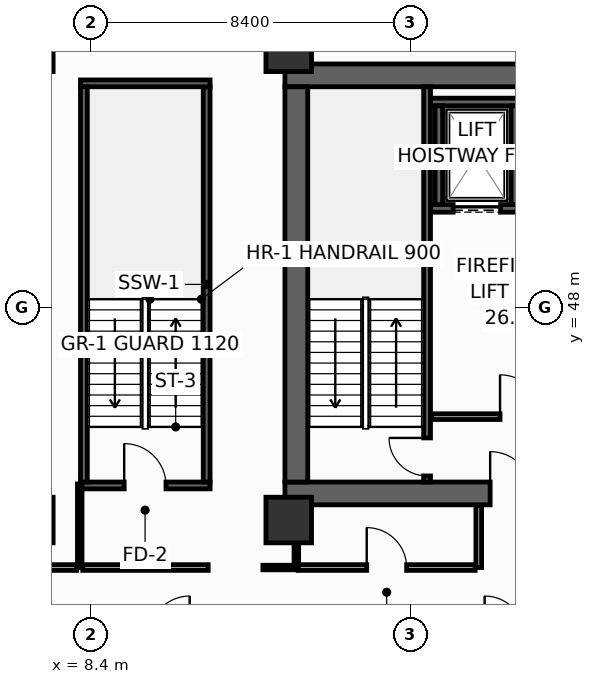
"""IFC4 building model, lengths in metres.
Left out: names, types, materials, properties, quantities, classifications, styles, units other than length and angle.
Written with IfcOpenShell. Run it as: python <this file> out.ifc"""

import sys

from ifc_helpers import new_model, si_unit, direction, frame, frame_2d, origin, origin_2d, place, context, subcontext, project, spatial, rectangle, hollow_rectangle, extrude, element, fill, save


model = new_model("IFC4")
c1 = context("Model", 3, precision=1e-05, world=origin(), true_north=direction((0.0, 1.0)))
c2 = subcontext(c1, "Body", "Model", "MODEL_VIEW")
j1 = project(units=[si_unit("LENGTHUNIT", "METRE"), si_unit("PLANEANGLEUNIT", "RADIAN")], contexts=[c1])
p1 = place(None, origin())
s1 = spatial("IfcSite", under=j1, at=p1, CompositionType="ELEMENT")
p2 = place(p1, origin())
s2 = spatial("IfcBuilding", under=s1, at=p2, CompositionType="ELEMENT")
p3 = place(p2, frame((0.0, 0.0, 60.4)))
s3 = spatial("IfcBuildingStorey", under=s2, at=p3, CompositionType="ELEMENT", Elevation=60.4)
p4 = place(p3, frame((13.5, 43.1, 0.0), z_axis=(0.0, 0.0, 1.0), x_axis=(1.0, 0.0, 0.0)))
e1 = element("IfcWall", 1, at=p4, inside=s3, PredefinedType="SHEAR", context=c2, shape_type="SweptSolid", body=[
    extrude(rectangle(XDim=32.9, YDim=0.6, at=frame_2d((16.45, 0.0))), origin(), (0.0, 0.0, 1.0), 4.15),
])
p5 = place(p4, frame((5.4, 0.0, 0.0)))
e2 = element("IfcOpeningElement", 2, at=p5, cuts=e1, PredefinedType="OPENING", context=c2, shape_type="SweptSolid", body=[
    extrude(rectangle(XDim=1.1, YDim=2.15, at=frame_2d((0.55, 1.075))), frame((0.0, 0.31, 0.0), z_axis=(0.0, -1.0, 0.0), x_axis=(1.0, 0.0, 0.0)), (0.0, 0.0, 1.0), 0.62),
])
p6 = place(p4, frame((25.6, 0.0, 0.0)))
e3 = element("IfcOpeningElement", 3, at=p6, cuts=e1, PredefinedType="OPENING", context=c2, shape_type="SweptSolid", body=[
    extrude(rectangle(XDim=1.1, YDim=2.15, at=frame_2d((0.55, 1.075))), frame((0.0, 0.31, 0.0), z_axis=(0.0, -1.0, 0.0), x_axis=(1.0, 0.0, 0.0)), (0.0, 0.0, 1.0), 0.62),
])
p7 = place(p3, frame((13.5, 54.1, 0.0), z_axis=(0.0, 0.0, 1.0), x_axis=(1.0, 0.0, 0.0)))
e4 = element("IfcWall", 4, at=p7, inside=s3, PredefinedType="SHEAR", context=c2, shape_type="SweptSolid", body=[
    extrude(rectangle(XDim=32.9, YDim=0.6, at=frame_2d((16.45, 0.0))), origin(), (0.0, 0.0, 1.0), 4.15),
])
p8 = place(p3, frame((13.8, 43.4, 0.0), z_axis=(0.0, 0.0, 1.0), x_axis=(0.0, 1.0, 0.0)))
e5 = element("IfcWall", 5, at=p8, inside=s3, PredefinedType="SHEAR", context=c2, shape_type="SweptSolid", body=[
    extrude(rectangle(XDim=10.4, YDim=0.6, at=frame_2d((5.2, 0.0))), origin(), (0.0, 0.0, 1.0), 4.15),
])
for number, where, z_axis, x_axis in (
    (6, (6.8, 54.8, 0.0), (0.0, 0.0, 1.0), (1.0, 0.0, 0.0)),
    (7, (13.6, 54.8, 0.0), (0.0, 0.0, 1.0), (1.0, 0.0, 0.0)),
    (8, (6.8, 42.4, 0.0), (0.0, 0.0, 1.0), (1.0, 0.0, 0.0)),
    (9, (13.6, 42.4, 0.0), (0.0, 0.0, 1.0), (1.0, 0.0, 0.0)),
):
    element("IfcColumn", number, at=place(p3, frame(where, z_axis=z_axis, x_axis=x_axis)), inside=s3, PredefinedType="COLUMN", context=c2, shape_type="SweptSolid", body=[
        extrude(hollow_rectangle(XDim=1.2, YDim=1.2, WallThickness=0.055, at=origin_2d()), origin(), (0.0, 0.0, 1.0), 4.4),
    ])
p9 = place(p3, frame((17.33, 50.6, 0.0), z_axis=(0.0, 0.0, 1.0), x_axis=(1.0, 0.0, 0.0)))
e10 = element("IfcWall", 10, at=p9, inside=s3, PredefinedType="SHEAR", context=c2, shape_type="SweptSolid", body=[
    extrude(rectangle(XDim=2.52, YDim=0.2, at=frame_2d((1.26, 0.0))), origin(), (0.0, 0.0, 1.0), 4.15),
])
p10 = place(p9, frame((0.595, 0.0, 0.0)))
e11 = element("IfcOpeningElement", 11, at=p10, cuts=e10, PredefinedType="OPENING", context=c2, shape_type="SweptSolid", body=[
    extrude(rectangle(XDim=1.25, YDim=2.3, at=frame_2d((0.625, 1.15))), frame((0.0, 0.11, 0.0), z_axis=(0.0, -1.0, 0.0), x_axis=(1.0, 0.0, 0.0)), (0.0, 0.0, 1.0), 0.22),
])
p11 = place(p3, frame((17.33, 53.4, 0.0), z_axis=(0.0, 0.0, 1.0), x_axis=(1.0, 0.0, 0.0)))
e12 = element("IfcWall", 12, at=p11, inside=s3, PredefinedType="SHEAR", context=c2, shape_type="SweptSolid", body=[
    extrude(rectangle(XDim=2.52, YDim=0.2, at=frame_2d((1.26, 0.0))), origin(), (0.0, 0.0, 1.0), 4.15),
])
for number, where, z_axis, x_axis in (
    (13, (17.55, 50.7, 0.0), (0.0, 0.0, 1.0), (0.0, 1.0, 0.0)),
    (14, (19.55, 50.7, 0.0), (0.0, 0.0, 1.0), (0.0, 1.0, 0.0)),
):
    element("IfcWall", number, at=place(p3, frame(where, z_axis=z_axis, x_axis=x_axis)), inside=s3, PredefinedType="SHEAR", context=c2, shape_type="SweptSolid", body=[
        extrude(rectangle(XDim=2.6, YDim=0.2, at=frame_2d((1.3, 0.0))), origin(), (0.0, 0.0, 1.0), 4.15),
    ])
p12 = place(p3, frame((17.24, 43.4, 0.0), z_axis=(0.0, 0.0, 1.0), x_axis=(0.0, 1.0, 0.0)))
e15 = element("IfcWall", 15, at=p12, inside=s3, PredefinedType="SHEAR", context=c2, shape_type="SweptSolid", body=[
    extrude(rectangle(XDim=10.4, YDim=0.18, at=frame_2d((5.2, 0.0))), origin(), (0.0, 0.0, 1.0), 4.15),
])
p13 = place(p12, frame((0.16, 0.0, 0.0)))
e16 = element("IfcOpeningElement", 16, at=p13, cuts=e15, PredefinedType="OPENING", context=c2, shape_type="SweptSolid", body=[
    extrude(rectangle(XDim=1.0, YDim=2.15, at=frame_2d((0.5, 1.075))), frame((0.0, 0.1, 0.0), z_axis=(0.0, -1.0, 0.0), x_axis=(1.0, 0.0, 0.0)), (0.0, 0.0, 1.0), 0.2),
])
p14 = place(p3, frame((8.12, 43.31, 0.0), z_axis=(0.0, 0.0, 1.0), x_axis=(1.0, 0.0, 0.0)))
e17 = element("IfcWall", 17, at=p14, inside=s3, PredefinedType="SHEAR", context=c2, shape_type="SweptSolid", body=[
    extrude(rectangle(XDim=3.41, YDim=0.18, at=frame_2d((1.705, 0.0))), origin(), (0.0, 0.0, 1.0), 4.15),
])
p15 = place(p14, frame((1.15, 0.0, 0.0)))
e18 = element("IfcOpeningElement", 18, at=p15, cuts=e17, PredefinedType="OPENING", context=c2, shape_type="SweptSolid", body=[
    extrude(rectangle(XDim=1.1, YDim=2.15, at=frame_2d((0.55, 1.075))), frame((0.0, 0.1, 0.0), z_axis=(0.0, -1.0, 0.0), x_axis=(1.0, 0.0, 0.0)), (0.0, 0.0, 1.0), 0.2),
])
p16 = place(p3, frame((11.44, 43.4, 0.0), z_axis=(0.0, 0.0, 1.0), x_axis=(0.0, 1.0, 0.0)))
e19 = element("IfcWall", 19, at=p16, inside=s3, PredefinedType="SHEAR", context=c2, shape_type="SweptSolid", body=[
    extrude(rectangle(XDim=10.4, YDim=0.18, at=frame_2d((5.2, 0.0))), origin(), (0.0, 0.0, 1.0), 4.15),
])
p17 = place(p3, frame((11.53, 53.89, 0.0), z_axis=(0.0, 0.0, 1.0), x_axis=(-1.0, 0.0, 0.0)))
e20 = element("IfcWall", 20, at=p17, inside=s3, PredefinedType="SHEAR", context=c2, shape_type="SweptSolid", body=[
    extrude(rectangle(XDim=3.41, YDim=0.18, at=frame_2d((1.705, 0.0))), origin(), (0.0, 0.0, 1.0), 4.15),
])
p18 = place(p3, frame((8.21, 53.8, 0.0), z_axis=(0.0, 0.0, 1.0), x_axis=(0.0, -1.0, 0.0)))
e21 = element("IfcWall", 21, at=p18, inside=s3, PredefinedType="SHEAR", context=c2, shape_type="SweptSolid", body=[
    extrude(rectangle(XDim=10.4, YDim=0.18, at=frame_2d((5.2, 0.0))), origin(), (0.0, 0.0, 1.0), 4.15),
])
p19 = place(p3, frame((17.36, 45.12, 0.0), z_axis=(0.0, 0.0, 1.0), x_axis=(1.0, 0.0, 0.0)))
e22 = element("IfcWall", 22, at=p19, inside=s3, PredefinedType="PARTITIONING", context=c2, shape_type="SweptSolid", body=[
    extrude(rectangle(XDim=5.14, YDim=0.15, at=frame_2d((2.57, 0.0))), origin(), (0.0, 0.0, 1.0), 4.15),
])
p20 = place(p19, frame((1.8, 0.0, 0.0)))
e23 = element("IfcOpeningElement", 23, at=p20, cuts=e22, PredefinedType="OPENING", context=c2, shape_type="SweptSolid", body=[
    extrude(rectangle(XDim=1.1, YDim=2.15, at=frame_2d((0.55, 1.075))), frame((0.0, 0.085, 0.0), z_axis=(0.0, -1.0, 0.0), x_axis=(1.0, 0.0, 0.0)), (0.0, 0.0, 1.0), 0.17),
])
p21 = place(p3, frame((12.92, 41.15, 0.0), z_axis=(0.0, 0.0, 1.0), x_axis=(1.0, 0.0, 0.0)))
e24 = element("IfcWall", 24, at=p21, inside=s3, PredefinedType="PARTITIONING", context=c2, shape_type="SweptSolid", body=[
    extrude(rectangle(XDim=0.93, YDim=0.12, at=frame_2d((0.465, 0.0))), origin(), (0.0, 0.0, 1.0), 4.15),
])
p22 = place(p3, frame((13.8, 41.23, 0.0), z_axis=(0.0, 0.0, 1.0), x_axis=(0.0, 1.0, 0.0)))
e25 = element("IfcWall", 25, at=p22, inside=s3, PredefinedType="PARTITIONING", context=c2, shape_type="SweptSolid", body=[
    extrude(rectangle(XDim=1.55, YDim=0.12, at=frame_2d((0.775, 0.0))), origin(), (0.0, 0.0, 1.0), 4.15),
])
p23 = place(p3, frame((8.1, 41.15, 0.0), z_axis=(0.0, 0.0, 1.0), x_axis=(0.0, 1.0, 0.0)))
e26 = element("IfcWall", 26, at=p23, inside=s3, PredefinedType="PARTITIONING", context=c2, shape_type="SweptSolid", body=[
    extrude(rectangle(XDim=2.2, YDim=0.12, at=frame_2d((1.1, 0.0))), origin(), (0.0, 0.0, 1.0), 3.335),
])
p24 = place(p3, frame((8.18, 41.15, 0.0), z_axis=(0.0, 0.0, 1.0), x_axis=(1.0, 0.0, 0.0)))
e27 = element("IfcWall", 27, at=p24, inside=s3, PredefinedType="PARTITIONING", context=c2, shape_type="SweptSolid", body=[
    extrude(rectangle(XDim=3.3, YDim=0.15, at=frame_2d((1.65, 0.0))), origin(), (0.0, 0.0, 1.0), 4.15),
])
p25 = place(p3, frame((5.914, 41.15, 0.0), z_axis=(0.0, 0.0, 1.0), x_axis=(1.0, 0.0, 0.0)))
e28 = element("IfcWall", 28, at=p25, inside=s3, PredefinedType="PARTITIONING", context=c2, shape_type="SweptSolid", body=[
    extrude(rectangle(XDim=2.106, YDim=0.15, at=frame_2d((1.053, 0.0))), origin(), (0.0, 0.0, 1.0), 3.635),
])
p26 = place(p3, frame((18.6, 41.15, 0.0), z_axis=(0.0, 0.0, 1.0), x_axis=(0.0, 1.0, 0.0)))
e29 = element("IfcWall", 29, at=p26, inside=s3, PredefinedType="PARTITIONING", context=c2, shape_type="SweptSolid", body=[
    extrude(rectangle(XDim=1.63, YDim=0.15, at=frame_2d((0.815, 0.0))), origin(), (0.0, 0.0, 1.0), 4.15),
])
p27 = place(p3, frame((13.85, 41.15, 0.0), z_axis=(0.0, 0.0, 1.0), x_axis=(1.0, 0.0, 0.0)))
e30 = element("IfcWall", 30, at=p27, inside=s3, PredefinedType="PARTITIONING", context=c2, shape_type="SweptSolid", body=[
    extrude(rectangle(XDim=4.655, YDim=0.15, at=frame_2d((2.327, 0.0))), origin(), (0.0, 0.0, 1.0), 4.15),
])
p28 = place(p27, frame((1.802, 0.0, 0.0)))
e31 = element("IfcOpeningElement", 31, at=p28, cuts=e30, PredefinedType="OPENING", context=c2, shape_type="SweptSolid", body=[
    extrude(rectangle(XDim=1.05, YDim=2.15, at=frame_2d((0.525, 1.075))), frame((0.0, 0.085, 0.0), z_axis=(0.0, -1.0, 0.0), x_axis=(1.0, 0.0, 0.0)), (0.0, 0.0, 1.0), 0.17),
])
p29 = place(p10, origin())
e32 = element("IfcDoor", 32, at=p29, inside=s3, OperationType="SLIDING_TO_LEFT", PredefinedType="DOOR", context=c2, shape_type="SweptSolid", body=[
    extrude(rectangle(XDim=1.25, YDim=2.3, at=frame_2d((0.625, 1.15))), frame((0.0, 0.025, 0.0), z_axis=(0.0, -1.0, 0.0), x_axis=(1.0, 0.0, 0.0)), (0.0, 0.0, 1.0), 0.05),
])
fill(e11, e32)
p30 = place(p13, origin())
e33 = element("IfcDoor", 33, at=p30, inside=s3, OperationType="SINGLE_SWING_RIGHT", PredefinedType="DOOR", context=c2, shape_type="SweptSolid", body=[
    extrude(rectangle(XDim=1.0, YDim=2.15, at=frame_2d((0.5, 1.075))), frame((0.0, 0.025, 0.0), z_axis=(0.0, -1.0, 0.0), x_axis=(1.0, 0.0, 0.0)), (0.0, 0.0, 1.0), 0.05),
])
fill(e16, e33)
p31 = place(p15, origin())
e34 = element("IfcDoor", 34, at=p31, inside=s3, OperationType="SINGLE_SWING_LEFT", PredefinedType="DOOR", context=c2, shape_type="SweptSolid", body=[
    extrude(rectangle(XDim=1.1, YDim=2.15, at=frame_2d((0.55, 1.075))), frame((0.0, 0.025, 0.0), z_axis=(0.0, -1.0, 0.0), x_axis=(1.0, 0.0, 0.0)), (0.0, 0.0, 1.0), 0.05),
])
fill(e18, e34)
p32 = place(p20, origin())
e35 = element("IfcDoor", 35, at=p32, inside=s3, OperationType="SINGLE_SWING_LEFT", PredefinedType="DOOR", context=c2, shape_type="SweptSolid", body=[
    extrude(rectangle(XDim=1.1, YDim=2.15, at=frame_2d((0.55, 1.075))), frame((0.0, 0.025, 0.0), z_axis=(0.0, -1.0, 0.0), x_axis=(1.0, 0.0, 0.0)), (0.0, 0.0, 1.0), 0.05),
])
fill(e23, e35)
p33 = place(p5, origin())
e36 = element("IfcDoor", 36, at=p33, inside=s3, OperationType="SINGLE_SWING_LEFT", PredefinedType="DOOR", context=c2, shape_type="SweptSolid", body=[
    extrude(rectangle(XDim=1.1, YDim=2.15, at=frame_2d((0.55, 1.075))), frame((0.0, 0.025, 0.0), z_axis=(0.0, -1.0, 0.0), x_axis=(1.0, 0.0, 0.0)), (0.0, 0.0, 1.0), 0.05),
])
fill(e2, e36)
p34 = place(p28, origin())
e37 = element("IfcDoor", 37, at=p34, inside=s3, OperationType="SINGLE_SWING_LEFT", PredefinedType="DOOR", context=c2, shape_type="SweptSolid", body=[
    extrude(rectangle(XDim=1.05, YDim=2.15, at=frame_2d((0.525, 1.075))), frame((0.0, 0.025, 0.0), z_axis=(0.0, -1.0, 0.0), x_axis=(1.0, 0.0, 0.0)), (0.0, 0.0, 1.0), 0.05),
])
fill(e31, e37)
save(model, sys.argv[1])
